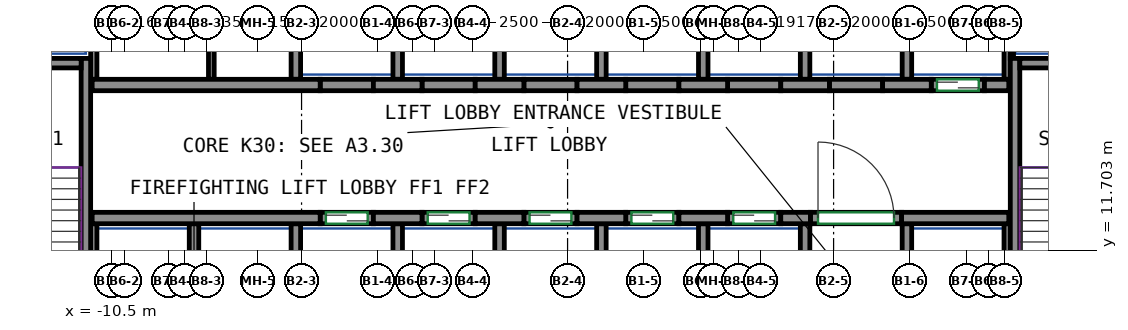
"""IFC4 building model, lengths in metres.
Left out: names, types, materials, properties, quantities, classifications, styles, units other than length and angle.
Written with IfcOpenShell. Run it as: python <this file> out.ifc"""

import sys

from ifc_helpers import new_model, si_unit, direction, frame, frame_2d, origin, place, context, subcontext, project, spatial, rectangle, extrude, source, transform, mapped, element, fill, save


model = new_model("IFC4")
c1 = context("Model", 3, precision=1e-05, world=origin(), true_north=direction((0.0, 1.0)))
c2 = subcontext(c1, "Body", "Model", "MODEL_VIEW")
j1 = project(units=[si_unit("LENGTHUNIT", "METRE"), si_unit("PLANEANGLEUNIT", "RADIAN")], contexts=[c1])
p1 = place(None, origin())
s1 = spatial("IfcSite", under=j1, at=p1, CompositionType="ELEMENT")
p2 = place(p1, origin())
s2 = spatial("IfcBuilding", under=s1, at=p2, CompositionType="ELEMENT")
p3 = place(p2, frame((0.0, 0.0, 124.6)))
s3 = spatial("IfcBuildingStorey", under=s2, at=p3, CompositionType="ELEMENT", Elevation=124.6)
m1 = source(origin(), c2, "Body", "SweptSolid", [
    extrude(rectangle(XDim=7.75, YDim=0.25, at=frame_2d((3.875, 0.0))), origin(), (0.0, 0.0, 1.0), 3.6),
])
p4 = place(p3, frame((-11.175, 9.0, 0.0), z_axis=(0.0, 0.0, 1.0), x_axis=(0.0, 1.0, 0.0)))
e1 = element("IfcWall", 1, at=p4, inside=s3, PredefinedType="SHEAR", context=c2, shape_type="MappedRepresentation", body=[
    mapped(m1, transform((0.0, 0.0, 0.0))),
])
m2 = source(origin(), c2, "Body", "SweptSolid", [
    extrude(rectangle(XDim=3.7, YDim=0.25, at=frame_2d((1.85, 0.0))), origin(), (0.0, 0.0, 1.0), 3.6),
])
p5 = place(p3, frame((-15.0, 16.625, 0.0), z_axis=(0.0, 0.0, 1.0), x_axis=(1.0, 0.0, 0.0)))
e2 = element("IfcWall", 2, at=p5, inside=s3, PredefinedType="SHEAR", context=c2, shape_type="MappedRepresentation", body=[
    mapped(m2, transform((0.0, 0.0, 0.0))),
])
p6 = place(p3, frame((13.275, 9.0, 0.0), z_axis=(0.0, 0.0, 1.0), x_axis=(0.0, 1.0, 0.0)))
e3 = element("IfcWall", 3, at=p6, inside=s3, PredefinedType="SHEAR", context=c2, shape_type="MappedRepresentation", body=[
    mapped(m1, transform((0.0, 0.0, 0.0))),
])
m3 = source(origin(), c2, "Body", "SweptSolid", [
    extrude(rectangle(XDim=3.7, YDim=0.25, at=frame_2d((1.85, 0.0))), origin(), (0.0, 0.0, 1.0), 3.6),
])
p7 = place(p3, frame((13.4, 16.625, 0.0), z_axis=(0.0, 0.0, 1.0), x_axis=(1.0, 0.0, 0.0)))
e4 = element("IfcWall", 4, at=p7, inside=s3, PredefinedType="SHEAR", context=c2, shape_type="MappedRepresentation", body=[
    mapped(m3, transform((0.0, 0.0, 0.0))),
])
m4 = source(origin(), c2, "Body", "SweptSolid", [
    extrude(rectangle(XDim=6.0, YDim=0.3, at=frame_2d((3.0, 0.0))), origin(), (0.0, 0.0, 1.0), 3.6),
])
p8 = place(p3, frame((-11.01, 12.55, 0.0), z_axis=(0.0, 0.0, 1.0), x_axis=(1.0, 0.0, 0.0)))
e5 = element("IfcWall", 5, at=p8, inside=s3, PredefinedType="SHEAR", context=c2, shape_type="MappedRepresentation", body=[
    mapped(m4, transform((0.0, 0.0, 0.0))),
])
m5 = source(origin(), c2, "Body", "SweptSolid", [
    extrude(rectangle(XDim=1.28, YDim=0.3, at=frame_2d((0.64, 0.0))), origin(), (0.0, 0.0, 1.0), 3.6),
])
for number, where, z_axis, x_axis in (
    (6, (-3.61, 12.55, 0.0), (0.0, 0.0, 1.0), (1.0, 0.0, 0.0)),
    (7, (-0.93, 12.55, 0.0), (0.0, 0.0, 1.0), (1.0, 0.0, 0.0)),
    (8, (1.75, 12.55, 0.0), (0.0, 0.0, 1.0), (1.0, 0.0, 0.0)),
    (9, (4.43, 12.55, 0.0), (0.0, 0.0, 1.0), (1.0, 0.0, 0.0)),
):
    element("IfcWall", number, at=place(p3, frame(where, z_axis=z_axis, x_axis=x_axis)), inside=s3, PredefinedType="SHEAR", context=c2, shape_type="MappedRepresentation", body=[
        mapped(m5, transform((0.0, 0.0, 0.0))),
    ])
m6 = source(origin(), c2, "Body", "SweptSolid", [
    extrude(rectangle(XDim=0.78, YDim=0.3, at=frame_2d((0.39, 0.0))), origin(), (0.0, 0.0, 1.0), 3.6),
])
p9 = place(p3, frame((7.11, 12.55, 0.0), z_axis=(0.0, 0.0, 1.0), x_axis=(1.0, 0.0, 0.0)))
e10 = element("IfcWall", 10, at=p9, inside=s3, PredefinedType="SHEAR", context=c2, shape_type="MappedRepresentation", body=[
    mapped(m6, transform((0.0, 0.0, 0.0))),
])
m7 = source(origin(), c2, "Body", "SweptSolid", [
    extrude(rectangle(XDim=2.82, YDim=0.3, at=frame_2d((1.41, 0.0))), origin(), (0.0, 0.0, 1.0), 3.6),
])
p10 = place(p3, frame((10.29, 12.55, 0.0), z_axis=(0.0, 0.0, 1.0), x_axis=(1.0, 0.0, 0.0)))
e11 = element("IfcWall", 11, at=p10, inside=s3, PredefinedType="SHEAR", context=c2, shape_type="MappedRepresentation", body=[
    mapped(m7, transform((0.0, 0.0, 0.0))),
])
p11 = place(p3, frame((-11.01, 16.05, 0.0), z_axis=(0.0, 0.0, 1.0), x_axis=(1.0, 0.0, 0.0)))
e12 = element("IfcWall", 12, at=p11, inside=s3, PredefinedType="SHEAR", context=c2, shape_type="MappedRepresentation", body=[
    mapped(m4, transform((0.0, 0.0, 0.0))),
])
for number, where, z_axis, x_axis in (
    (13, (-3.61, 16.05, 0.0), (0.0, 0.0, 1.0), (1.0, 0.0, 0.0)),
    (14, (-0.93, 16.05, 0.0), (0.0, 0.0, 1.0), (1.0, 0.0, 0.0)),
    (15, (1.75, 16.05, 0.0), (0.0, 0.0, 1.0), (1.0, 0.0, 0.0)),
    (16, (4.43, 16.05, 0.0), (0.0, 0.0, 1.0), (1.0, 0.0, 0.0)),
):
    element("IfcWall", number, at=place(p3, frame(where, z_axis=z_axis, x_axis=x_axis)), inside=s3, PredefinedType="SHEAR", context=c2, shape_type="MappedRepresentation", body=[
        mapped(m5, transform((0.0, 0.0, 0.0))),
    ])
m8 = source(origin(), c2, "Body", "SweptSolid", [
    extrude(rectangle(XDim=1.28, YDim=0.3, at=frame_2d((0.64, 0.0))), origin(), (0.0, 0.0, 1.0), 3.6),
])
p12 = place(p3, frame((7.11, 16.05, 0.0), z_axis=(0.0, 0.0, 1.0), x_axis=(1.0, 0.0, 0.0)))
e17 = element("IfcWall", 17, at=p12, inside=s3, PredefinedType="SHEAR", context=c2, shape_type="MappedRepresentation", body=[
    mapped(m8, transform((0.0, 0.0, 0.0))),
])
p13 = place(p3, frame((9.79, 16.05, 0.0), z_axis=(0.0, 0.0, 1.0), x_axis=(1.0, 0.0, 0.0)))
e18 = element("IfcWall", 18, at=p13, inside=s3, PredefinedType="SHEAR", context=c2, shape_type="MappedRepresentation", body=[
    mapped(m5, transform((0.0, 0.0, 0.0))),
])
m9 = source(origin(), c2, "Body", "SweptSolid", [
    extrude(rectangle(XDim=0.64, YDim=0.3, at=frame_2d((0.32, 0.0))), origin(), (0.0, 0.0, 1.0), 3.6),
])
p14 = place(p3, frame((12.47, 16.05, 0.0), z_axis=(0.0, 0.0, 1.0), x_axis=(1.0, 0.0, 0.0)))
e19 = element("IfcWall", 19, at=p14, inside=s3, PredefinedType="SHEAR", context=c2, shape_type="MappedRepresentation", body=[
    mapped(m9, transform((0.0, 0.0, 0.0))),
])
m10 = source(origin(), c2, "Body", "SweptSolid", [
    extrude(rectangle(XDim=1.4, YDim=0.3, at=frame_2d((0.7, 0.0))), origin(), (0.0, 0.0, 1.0), 3.6),
])
p15 = place(p3, frame((-5.01, 12.55, 0.0), z_axis=(0.0, 0.0, 1.0), x_axis=(1.0, 0.0, 0.0)))
e20 = element("IfcWall", 20, at=p15, inside=s3, PredefinedType="PARTITIONING", context=c2, shape_type="MappedRepresentation", body=[
    mapped(m10, transform((0.0, 0.0, 0.0))),
])
p16 = place(p15, frame((0.15, 0.0, 0.0)))
e21 = element("IfcOpeningElement", 21, at=p16, cuts=e20, PredefinedType="OPENING", context=c2, shape_type="SweptSolid", body=[
    extrude(rectangle(XDim=1.1, YDim=2.1, at=frame_2d((0.55, 1.05))), frame((0.0, 0.16, 0.0), z_axis=(0.0, -1.0, 0.0), x_axis=(1.0, 0.0, 0.0)), (0.0, 0.0, 1.0), 0.32),
])
m11 = source(origin(), c2, "Body", "SweptSolid", [
    extrude(rectangle(XDim=1.4, YDim=0.3, at=frame_2d((0.7, 0.0))), origin(), (0.0, 0.0, 1.0), 3.6),
])
p17 = place(p3, frame((-2.33, 12.55, 0.0), z_axis=(0.0, 0.0, 1.0), x_axis=(1.0, 0.0, 0.0)))
e22 = element("IfcWall", 22, at=p17, inside=s3, PredefinedType="PARTITIONING", context=c2, shape_type="MappedRepresentation", body=[
    mapped(m11, transform((0.0, 0.0, 0.0))),
])
p18 = place(p17, frame((0.15, 0.0, 0.0)))
e23 = element("IfcOpeningElement", 23, at=p18, cuts=e22, PredefinedType="OPENING", context=c2, shape_type="SweptSolid", body=[
    extrude(rectangle(XDim=1.1, YDim=2.1, at=frame_2d((0.55, 1.05))), frame((0.0, 0.16, 0.0), z_axis=(0.0, -1.0, 0.0), x_axis=(1.0, 0.0, 0.0)), (0.0, 0.0, 1.0), 0.32),
])
p19 = place(p3, frame((0.35, 12.55, 0.0), z_axis=(0.0, 0.0, 1.0), x_axis=(1.0, 0.0, 0.0)))
e24 = element("IfcWall", 24, at=p19, inside=s3, PredefinedType="PARTITIONING", context=c2, shape_type="MappedRepresentation", body=[
    mapped(m10, transform((0.0, 0.0, 0.0))),
])
p20 = place(p19, frame((0.15, 0.0, 0.0)))
e25 = element("IfcOpeningElement", 25, at=p20, cuts=e24, PredefinedType="OPENING", context=c2, shape_type="SweptSolid", body=[
    extrude(rectangle(XDim=1.1, YDim=2.1, at=frame_2d((0.55, 1.05))), frame((0.0, 0.16, 0.0), z_axis=(0.0, -1.0, 0.0), x_axis=(1.0, 0.0, 0.0)), (0.0, 0.0, 1.0), 0.32),
])
p21 = place(p3, frame((3.03, 12.55, 0.0), z_axis=(0.0, 0.0, 1.0), x_axis=(1.0, 0.0, 0.0)))
e26 = element("IfcWall", 26, at=p21, inside=s3, PredefinedType="PARTITIONING", context=c2, shape_type="MappedRepresentation", body=[
    mapped(m10, transform((0.0, 0.0, 0.0))),
])
p22 = place(p21, frame((0.15, 0.0, 0.0)))
e27 = element("IfcOpeningElement", 27, at=p22, cuts=e26, PredefinedType="OPENING", context=c2, shape_type="SweptSolid", body=[
    extrude(rectangle(XDim=1.1, YDim=2.1, at=frame_2d((0.55, 1.05))), frame((0.0, 0.16, 0.0), z_axis=(0.0, -1.0, 0.0), x_axis=(1.0, 0.0, 0.0)), (0.0, 0.0, 1.0), 0.32),
])
p23 = place(p3, frame((5.71, 12.55, 0.0), z_axis=(0.0, 0.0, 1.0), x_axis=(1.0, 0.0, 0.0)))
e28 = element("IfcWall", 28, at=p23, inside=s3, PredefinedType="PARTITIONING", context=c2, shape_type="MappedRepresentation", body=[
    mapped(m11, transform((0.0, 0.0, 0.0))),
])
p24 = place(p23, frame((0.15, 0.0, 0.0)))
e29 = element("IfcOpeningElement", 29, at=p24, cuts=e28, PredefinedType="OPENING", context=c2, shape_type="SweptSolid", body=[
    extrude(rectangle(XDim=1.1, YDim=2.1, at=frame_2d((0.55, 1.05))), frame((0.0, 0.16, 0.0), z_axis=(0.0, -1.0, 0.0), x_axis=(1.0, 0.0, 0.0)), (0.0, 0.0, 1.0), 0.32),
])
p25 = place(p3, frame((11.07, 16.05, 0.0), z_axis=(0.0, 0.0, 1.0), x_axis=(1.0, 0.0, 0.0)))
e30 = element("IfcWall", 30, at=p25, inside=s3, PredefinedType="PARTITIONING", context=c2, shape_type="MappedRepresentation", body=[
    mapped(m10, transform((0.0, 0.0, 0.0))),
])
p26 = place(p25, frame((0.15, 0.0, 0.0)))
e31 = element("IfcOpeningElement", 31, at=p26, cuts=e30, PredefinedType="OPENING", context=c2, shape_type="SweptSolid", body=[
    extrude(rectangle(XDim=1.1, YDim=2.1, at=frame_2d((0.55, 1.05))), frame((0.0, 0.16, 0.0), z_axis=(0.0, -1.0, 0.0), x_axis=(1.0, 0.0, 0.0)), (0.0, 0.0, 1.0), 0.32),
])
m12 = source(origin(), c2, "Body", "SweptSolid", [
    extrude(rectangle(XDim=2.4, YDim=0.3, at=frame_2d((1.2, 0.0))), origin(), (0.0, 0.0, 1.0), 3.6),
])
p27 = place(p3, frame((7.89, 12.55, 0.0), z_axis=(0.0, 0.0, 1.0), x_axis=(1.0, 0.0, 0.0)))
e32 = element("IfcWall", 32, at=p27, inside=s3, PredefinedType="PARTITIONING", context=c2, shape_type="MappedRepresentation", body=[
    mapped(m12, transform((0.0, 0.0, 0.0))),
])
p28 = place(p27, frame((0.2, 0.0, 0.0)))
e33 = element("IfcOpeningElement", 33, at=p28, cuts=e32, PredefinedType="OPENING", context=c2, shape_type="SweptSolid", body=[
    extrude(rectangle(XDim=2.0, YDim=2.1, at=frame_2d((1.0, 1.05))), frame((0.0, 0.16, 0.0), z_axis=(0.0, -1.0, 0.0), x_axis=(1.0, 0.0, 0.0)), (0.0, 0.0, 1.0), 0.32),
])
p29 = place(p3, frame((-5.01, 16.05, 0.0), z_axis=(0.0, 0.0, 1.0), x_axis=(1.0, 0.0, 0.0)))
e34 = element("IfcWall", 34, at=p29, inside=s3, PredefinedType="PARTITIONING", context=c2, shape_type="MappedRepresentation", body=[
    mapped(m10, transform((0.0, 0.0, 0.0))),
])
p30 = place(p3, frame((-2.33, 16.05, 0.0), z_axis=(0.0, 0.0, 1.0), x_axis=(1.0, 0.0, 0.0)))
e35 = element("IfcWall", 35, at=p30, inside=s3, PredefinedType="PARTITIONING", context=c2, shape_type="MappedRepresentation", body=[
    mapped(m11, transform((0.0, 0.0, 0.0))),
])
for number, where, z_axis, x_axis in (
    (36, (0.35, 16.05, 0.0), (0.0, 0.0, 1.0), (1.0, 0.0, 0.0)),
    (37, (3.03, 16.05, 0.0), (0.0, 0.0, 1.0), (1.0, 0.0, 0.0)),
):
    element("IfcWall", number, at=place(p3, frame(where, z_axis=z_axis, x_axis=x_axis)), inside=s3, PredefinedType="PARTITIONING", context=c2, shape_type="MappedRepresentation", body=[
        mapped(m10, transform((0.0, 0.0, 0.0))),
    ])
for number, where, z_axis, x_axis in (
    (38, (5.71, 16.05, 0.0), (0.0, 0.0, 1.0), (1.0, 0.0, 0.0)),
    (39, (8.39, 16.05, 0.0), (0.0, 0.0, 1.0), (1.0, 0.0, 0.0)),
):
    element("IfcWall", number, at=place(p3, frame(where, z_axis=z_axis, x_axis=x_axis)), inside=s3, PredefinedType="PARTITIONING", context=c2, shape_type="MappedRepresentation", body=[
        mapped(m11, transform((0.0, 0.0, 0.0))),
    ])
m13 = source(origin(), c2, "Body", "SweptSolid", [
    extrude(rectangle(XDim=3.275, YDim=0.165, at=frame_2d((1.638, 0.0))), origin(), (0.0, 0.0, 1.0), 3.6),
])
p31 = place(p3, frame((13.067, 16.2, 0.0), z_axis=(0.0, 0.0, 1.0), x_axis=(0.0, 1.0, 0.0)))
e40 = element("IfcWall", 40, at=p31, inside=s3, PredefinedType="PARTITIONING", context=c2, shape_type="MappedRepresentation", body=[
    mapped(m13, transform((0.0, 0.0, 0.0))),
])
m14 = source(origin(), c2, "Body", "SweptSolid", [
    extrude(rectangle(XDim=4.8, YDim=0.165, at=frame_2d((2.4, 0.0))), origin(), (0.0, 0.0, 1.0), 3.6),
])
p32 = place(p3, frame((-10.968, 16.2, 0.0), z_axis=(0.0, 0.0, 1.0), x_axis=(0.0, 1.0, 0.0)))
e41 = element("IfcWall", 41, at=p32, inside=s3, PredefinedType="PARTITIONING", context=c2, shape_type="MappedRepresentation", body=[
    mapped(m14, transform((0.0, 0.0, 0.0))),
])
m15 = source(origin(), c2, "Body", "SweptSolid", [
    extrude(rectangle(XDim=3.275, YDim=0.25, at=frame_2d((1.638, 0.0))), origin(), (0.0, 0.0, 1.0), 3.6),
])
p33 = place(p3, frame((10.43, 16.2, 0.0), z_axis=(0.0, 0.0, 1.0), x_axis=(0.0, 1.0, 0.0)))
e42 = element("IfcWall", 42, at=p33, inside=s3, PredefinedType="PARTITIONING", context=c2, shape_type="MappedRepresentation", body=[
    mapped(m15, transform((0.0, 0.0, 0.0))),
])
m16 = source(origin(), c2, "Body", "SweptSolid", [
    extrude(rectangle(XDim=2.725, YDim=0.085, at=frame_2d((1.363, 0.0))), origin(), (0.0, 0.0, 1.0), 3.6),
])
p34 = place(p3, frame((13.192, 16.75, 0.0), z_axis=(0.0, 0.0, 1.0), x_axis=(0.0, 1.0, 0.0)))
e43 = element("IfcWall", 43, at=p34, inside=s3, PredefinedType="PARTITIONING", context=c2, shape_type="MappedRepresentation", body=[
    mapped(m16, transform((0.0, 0.0, 0.0))),
])
for number, where, z_axis, x_axis in (
    (44, (2.39, 16.2, 0.0), (0.0, 0.0, 1.0), (0.0, 1.0, 0.0)),
    (45, (5.07, 16.2, 0.0), (0.0, 0.0, 1.0), (0.0, 1.0, 0.0)),
    (46, (7.75, 16.2, 0.0), (0.0, 0.0, 1.0), (0.0, 1.0, 0.0)),
    (47, (-0.29, 16.2, 0.0), (0.0, 0.0, 1.0), (0.0, 1.0, 0.0)),
    (48, (-2.97, 16.2, 0.0), (0.0, 0.0, 1.0), (0.0, 1.0, 0.0)),
    (49, (-5.65, 16.2, 0.0), (0.0, 0.0, 1.0), (0.0, 1.0, 0.0)),
):
    element("IfcWall", number, at=place(p3, frame(where, z_axis=z_axis, x_axis=x_axis)), inside=s3, PredefinedType="PARTITIONING", context=c2, shape_type="MappedRepresentation", body=[
        mapped(m15, transform((0.0, 0.0, 0.0))),
    ])
m17 = source(origin(), c2, "Body", "SweptSolid", [
    extrude(rectangle(XDim=3.4, YDim=0.25, at=frame_2d((1.7, 0.0))), origin(), (0.0, 0.0, 1.0), 3.6),
])
p35 = place(p3, frame((10.43, 9.0, 0.0), z_axis=(0.0, 0.0, 1.0), x_axis=(0.0, 1.0, 0.0)))
e50 = element("IfcWall", 50, at=p35, inside=s3, PredefinedType="PARTITIONING", context=c2, shape_type="MappedRepresentation", body=[
    mapped(m17, transform((0.0, 0.0, 0.0))),
])
m18 = source(origin(), c2, "Body", "SweptSolid", [
    extrude(rectangle(XDim=3.4, YDim=0.165, at=frame_2d((1.7, 0.0))), origin(), (0.0, 0.0, 1.0), 3.6),
])
p36 = place(p3, frame((13.067, 9.0, 0.0), z_axis=(0.0, 0.0, 1.0), x_axis=(0.0, 1.0, 0.0)))
e51 = element("IfcWall", 51, at=p36, inside=s3, PredefinedType="PARTITIONING", context=c2, shape_type="MappedRepresentation", body=[
    mapped(m18, transform((0.0, 0.0, 0.0))),
])
for number, where, z_axis, x_axis in (
    (52, (2.39, 9.0, 0.0), (0.0, 0.0, 1.0), (0.0, 1.0, 0.0)),
    (53, (5.07, 9.0, 0.0), (0.0, 0.0, 1.0), (0.0, 1.0, 0.0)),
    (54, (7.75, 9.0, 0.0), (0.0, 0.0, 1.0), (0.0, 1.0, 0.0)),
    (55, (-0.29, 9.0, 0.0), (0.0, 0.0, 1.0), (0.0, 1.0, 0.0)),
):
    element("IfcWall", number, at=place(p3, frame(where, z_axis=z_axis, x_axis=x_axis)), inside=s3, PredefinedType="PARTITIONING", context=c2, shape_type="MappedRepresentation", body=[
        mapped(m17, transform((0.0, 0.0, 0.0))),
    ])
p37 = place(p3, frame((-10.968, 9.0, 0.0), z_axis=(0.0, 0.0, 1.0), x_axis=(0.0, 1.0, 0.0)))
e56 = element("IfcWall", 56, at=p37, inside=s3, PredefinedType="PARTITIONING", context=c2, shape_type="MappedRepresentation", body=[
    mapped(m18, transform((0.0, 0.0, 0.0))),
])
for number, where, z_axis, x_axis in (
    (57, (-2.97, 9.0, 0.0), (0.0, 0.0, 1.0), (0.0, 1.0, 0.0)),
    (58, (-5.65, 9.0, 0.0), (0.0, 0.0, 1.0), (0.0, 1.0, 0.0)),
    (59, (-8.33, 9.0, 0.0), (0.0, 0.0, 1.0), (0.0, 1.0, 0.0)),
):
    element("IfcWall", number, at=place(p3, frame(where, z_axis=z_axis, x_axis=x_axis)), inside=s3, PredefinedType="PARTITIONING", context=c2, shape_type="MappedRepresentation", body=[
        mapped(m17, transform((0.0, 0.0, 0.0))),
    ])
m19 = source(origin(), c2, "Body", "SweptSolid", [
    extrude(rectangle(XDim=4.8, YDim=0.15, at=frame_2d((2.4, 0.0))), origin(), (0.0, 0.0, 1.0), 3.6),
])
p38 = place(p3, frame((-7.875, 16.2, 0.0), z_axis=(0.0, 0.0, 1.0), x_axis=(0.0, 1.0, 0.0)))
e60 = element("IfcWall", 60, at=p38, inside=s3, PredefinedType="PARTITIONING", context=c2, shape_type="MappedRepresentation", body=[
    mapped(m19, transform((0.0, 0.0, 0.0))),
])
p39 = place(p28, origin())
e61 = element("IfcDoor", 61, at=p39, inside=s3, OperationType="DOUBLE_DOOR_SINGLE_SWING", PredefinedType="DOOR", context=c2, shape_type="SweptSolid", body=[
    extrude(rectangle(XDim=2.0, YDim=2.1, at=frame_2d((1.0, 1.05))), frame((0.0, 0.025, 0.0), z_axis=(0.0, -1.0, 0.0), x_axis=(1.0, 0.0, 0.0)), (0.0, 0.0, 1.0), 0.05),
])
fill(e33, e61)
p40 = place(p16, origin())
e62 = element("IfcDoor", 62, at=p40, inside=s3, OperationType="DOUBLE_DOOR_SLIDING", PredefinedType="DOOR", context=c2, shape_type="SweptSolid", body=[
    extrude(rectangle(XDim=1.1, YDim=2.1, at=frame_2d((0.55, 1.05))), frame((0.0, 0.025, 0.0), z_axis=(0.0, -1.0, 0.0), x_axis=(1.0, 0.0, 0.0)), (0.0, 0.0, 1.0), 0.05),
])
fill(e21, e62)
p41 = place(p18, origin())
e63 = element("IfcDoor", 63, at=p41, inside=s3, OperationType="DOUBLE_DOOR_SLIDING", PredefinedType="DOOR", context=c2, shape_type="SweptSolid", body=[
    extrude(rectangle(XDim=1.1, YDim=2.1, at=frame_2d((0.55, 1.05))), frame((0.0, 0.025, 0.0), z_axis=(0.0, -1.0, 0.0), x_axis=(1.0, 0.0, 0.0)), (0.0, 0.0, 1.0), 0.05),
])
fill(e23, e63)
p42 = place(p20, origin())
e64 = element("IfcDoor", 64, at=p42, inside=s3, OperationType="DOUBLE_DOOR_SLIDING", PredefinedType="DOOR", context=c2, shape_type="SweptSolid", body=[
    extrude(rectangle(XDim=1.1, YDim=2.1, at=frame_2d((0.55, 1.05))), frame((0.0, 0.025, 0.0), z_axis=(0.0, -1.0, 0.0), x_axis=(1.0, 0.0, 0.0)), (0.0, 0.0, 1.0), 0.05),
])
fill(e25, e64)
p43 = place(p22, origin())
e65 = element("IfcDoor", 65, at=p43, inside=s3, OperationType="DOUBLE_DOOR_SLIDING", PredefinedType="DOOR", context=c2, shape_type="SweptSolid", body=[
    extrude(rectangle(XDim=1.1, YDim=2.1, at=frame_2d((0.55, 1.05))), frame((0.0, 0.025, 0.0), z_axis=(0.0, -1.0, 0.0), x_axis=(1.0, 0.0, 0.0)), (0.0, 0.0, 1.0), 0.05),
])
fill(e27, e65)
p44 = place(p24, origin())
e66 = element("IfcDoor", 66, at=p44, inside=s3, OperationType="DOUBLE_DOOR_SLIDING", PredefinedType="DOOR", context=c2, shape_type="SweptSolid", body=[
    extrude(rectangle(XDim=1.1, YDim=2.1, at=frame_2d((0.55, 1.05))), frame((0.0, 0.025, 0.0), z_axis=(0.0, -1.0, 0.0), x_axis=(1.0, 0.0, 0.0)), (0.0, 0.0, 1.0), 0.05),
])
fill(e29, e66)
p45 = place(p26, origin())
e67 = element("IfcDoor", 67, at=p45, inside=s3, OperationType="DOUBLE_DOOR_SLIDING", PredefinedType="DOOR", context=c2, shape_type="SweptSolid", body=[
    extrude(rectangle(XDim=1.1, YDim=2.1, at=frame_2d((0.55, 1.05))), frame((0.0, 0.025, 0.0), z_axis=(0.0, -1.0, 0.0), x_axis=(1.0, 0.0, 0.0)), (0.0, 0.0, 1.0), 0.05),
])
fill(e31, e67)
save(model, sys.argv[1])
